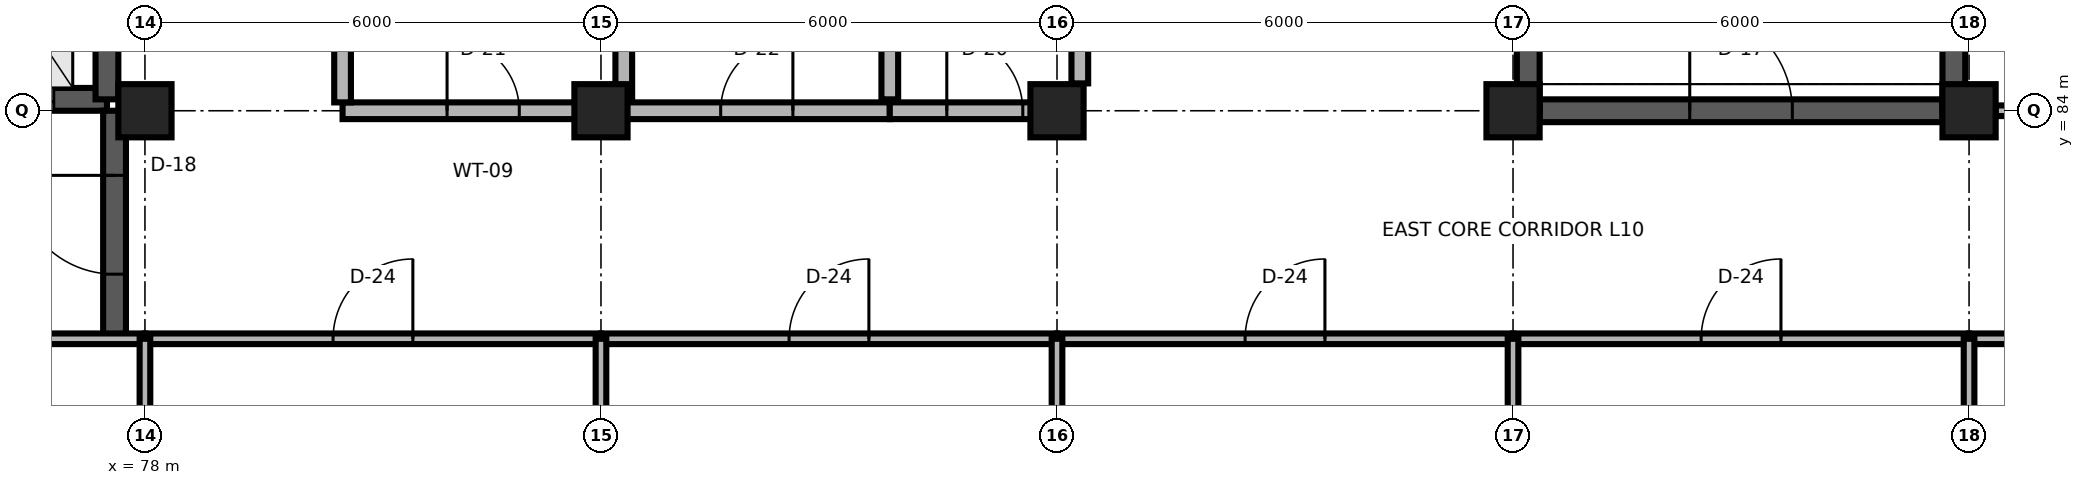
"""IFC4 building model, lengths in metres.
Left out: names, types, materials, properties, quantities, classifications, styles, units other than length and angle.
Written with IfcOpenShell. Run it as: python <this file> out.ifc"""

import sys

from ifc_helpers import new_model, si_unit, direction, frame, frame_2d, origin, origin_2d, place, context, subcontext, project, spatial, rectangle, extrude, element, fill, save


model = new_model("IFC4")
c1 = context("Model", 3, precision=1e-05, world=origin(), true_north=direction((0.0, 1.0)))
c2 = subcontext(c1, "Body", "Model", "MODEL_VIEW")
j1 = project(units=[si_unit("LENGTHUNIT", "METRE"), si_unit("PLANEANGLEUNIT", "RADIAN")], contexts=[c1])
p1 = place(None, origin())
s1 = spatial("IfcSite", under=j1, at=p1, CompositionType="ELEMENT")
p2 = place(p1, origin())
s2 = spatial("IfcBuilding", under=s1, at=p2, CompositionType="ELEMENT")
p3 = place(p2, frame((0.0, 0.0, 40.5)))
s3 = spatial("IfcBuildingStorey", under=s2, at=p3, CompositionType="ELEMENT", Elevation=40.5)
for number, where, z_axis, x_axis in (
    (1, (78.0, 84.0, 0.0), (0.0, 0.0, 1.0), (1.0, 0.0, 0.0)),
    (2, (84.0, 84.0, 0.0), (0.0, 0.0, 1.0), (1.0, 0.0, 0.0)),
    (3, (90.0, 84.0, 0.0), (0.0, 0.0, 1.0), (1.0, 0.0, 0.0)),
    (4, (96.0, 84.0, 0.0), (0.0, 0.0, 1.0), (1.0, 0.0, 0.0)),
    (5, (102.0, 84.0, 0.0), (0.0, 0.0, 1.0), (1.0, 0.0, 0.0)),
):
    element("IfcColumn", number, at=place(p3, frame(where, z_axis=z_axis, x_axis=x_axis)), inside=s3, PredefinedType="COLUMN", context=c2, shape_type="SweptSolid", body=[
        extrude(rectangle(XDim=0.7, YDim=0.7, at=origin_2d()), origin(), (0.0, 0.0, 1.0), 3.9),
    ])
p4 = place(p3, frame((96.35, 84.0, 0.0), z_axis=(0.0, 0.0, 1.0), x_axis=(1.0, 0.0, 0.0)))
e6 = element("IfcWall", 6, at=p4, inside=s3, PredefinedType="SHEAR", context=c2, shape_type="SweptSolid", body=[
    extrude(rectangle(XDim=5.3, YDim=0.3, at=frame_2d((2.65, 0.0))), origin(), (0.0, 0.0, 1.0), 3.66),
])
p5 = place(p4, frame((1.975, 0.0, 0.0)))
e7 = element("IfcOpeningElement", 7, at=p5, cuts=e6, PredefinedType="OPENING", context=c2, shape_type="SweptSolid", body=[
    extrude(rectangle(XDim=1.35, YDim=2.2, at=frame_2d((0.675, 1.1))), frame((0.0, 0.165, 0.0), z_axis=(0.0, -1.0, 0.0), x_axis=(1.0, 0.0, 0.0)), (0.0, 0.0, 1.0), 0.33),
])
for number, where, z_axis, x_axis in (
    (8, (96.2, 84.0, 0.0), (0.0, 0.0, 1.0), (0.0, 1.0, 0.0)),
    (9, (101.8, 84.0, 0.0), (0.0, 0.0, 1.0), (0.0, 1.0, 0.0)),
):
    element("IfcWall", number, at=place(p3, frame(where, z_axis=z_axis, x_axis=x_axis)), inside=s3, PredefinedType="SHEAR", context=c2, shape_type="SweptSolid", body=[
        extrude(rectangle(XDim=11.8, YDim=0.3, at=frame_2d((5.9, 0.0))), origin(), (0.0, 0.0, 1.0), 3.74),
    ])
p6 = place(p3, frame((75.0, 84.15, 0.0), z_axis=(0.0, 0.0, 1.0), x_axis=(1.0, 0.0, 0.0)))
e10 = element("IfcWall", 10, at=p6, inside=s3, PredefinedType="SHEAR", context=c2, shape_type="SweptSolid", body=[
    extrude(rectangle(XDim=2.5, YDim=0.3, at=frame_2d((1.25, 0.0))), origin(), (0.0, 0.0, 1.0), 3.74),
])
p7 = place(p6, frame((0.7, 0.0, 0.0)))
e11 = element("IfcOpeningElement", 11, at=p7, cuts=e10, PredefinedType="OPENING", context=c2, shape_type="SweptSolid", body=[
    extrude(rectangle(XDim=1.1, YDim=2.1, at=frame_2d((0.55, 1.05))), frame((0.0, 0.165, 0.0), z_axis=(0.0, -1.0, 0.0), x_axis=(1.0, 0.0, 0.0)), (0.0, 0.0, 1.0), 0.33),
])
p8 = place(p3, frame((77.5, 84.15, 0.0), z_axis=(0.0, 0.0, 1.0), x_axis=(0.0, 1.0, 0.0)))
e12 = element("IfcWall", 12, at=p8, inside=s3, PredefinedType="SHEAR", context=c2, shape_type="SweptSolid", body=[
    extrude(rectangle(XDim=3.4, YDim=0.3, at=frame_2d((1.7, 0.0))), origin(), (0.0, 0.0, 1.0), 3.74),
])
p9 = place(p3, frame((77.6, 81.0, 0.0), z_axis=(0.0, 0.0, 1.0), x_axis=(0.0, 1.0, 0.0)))
e13 = element("IfcWall", 13, at=p9, inside=s3, PredefinedType="SHEAR", context=c2, shape_type="SweptSolid", body=[
    extrude(rectangle(XDim=3.0, YDim=0.3, at=frame_2d((1.5, 0.0))), origin(), (0.0, 0.0, 1.0), 3.74),
])
p10 = place(p9, frame((0.85, 0.0, 0.0)))
e14 = element("IfcOpeningElement", 14, at=p10, cuts=e13, PredefinedType="OPENING", context=c2, shape_type="SweptSolid", body=[
    extrude(rectangle(XDim=1.3, YDim=2.2, at=frame_2d((0.65, 1.1))), frame((0.0, 0.165, 0.0), z_axis=(0.0, -1.0, 0.0), x_axis=(1.0, 0.0, 0.0)), (0.0, 0.0, 1.0), 0.33),
])
p11 = place(p3, frame((80.6, 84.0, 0.0), z_axis=(0.0, 0.0, 1.0), x_axis=(1.0, 0.0, 0.0)))
e15 = element("IfcWall", 15, at=p11, inside=s3, PredefinedType="PARTITIONING", context=c2, shape_type="SweptSolid", body=[
    extrude(rectangle(XDim=3.7, YDim=0.22, at=frame_2d((1.85, 0.0))), origin(), (0.0, 0.0, 1.0), 3.348),
])
p12 = place(p11, frame((1.375, 0.0, 0.0)))
e16 = element("IfcOpeningElement", 16, at=p12, cuts=e15, PredefinedType="OPENING", context=c2, shape_type="SweptSolid", body=[
    extrude(rectangle(XDim=0.95, YDim=2.15, at=frame_2d((0.475, 1.075))), frame((0.0, 0.125, 0.0), z_axis=(0.0, -1.0, 0.0), x_axis=(1.0, 0.0, 0.0)), (0.0, 0.0, 1.0), 0.25),
])
p13 = place(p3, frame((84.3, 84.0, 0.0), z_axis=(0.0, 0.0, 1.0), x_axis=(1.0, 0.0, 0.0)))
e17 = element("IfcWall", 17, at=p13, inside=s3, PredefinedType="PARTITIONING", context=c2, shape_type="SweptSolid", body=[
    extrude(rectangle(XDim=3.5, YDim=0.22, at=frame_2d((1.75, 0.0))), origin(), (0.0, 0.0, 1.0), 3.348),
])
p14 = place(p13, frame((1.275, 0.0, 0.0)))
e18 = element("IfcOpeningElement", 18, at=p14, cuts=e17, PredefinedType="OPENING", context=c2, shape_type="SweptSolid", body=[
    extrude(rectangle(XDim=0.95, YDim=2.1, at=frame_2d((0.475, 1.05))), frame((0.0, 0.125, 0.0), z_axis=(0.0, -1.0, 0.0), x_axis=(1.0, 0.0, 0.0)), (0.0, 0.0, 1.0), 0.25),
])
p15 = place(p3, frame((87.8, 84.0, 0.0), z_axis=(0.0, 0.0, 1.0), x_axis=(1.0, 0.0, 0.0)))
e19 = element("IfcWall", 19, at=p15, inside=s3, PredefinedType="PARTITIONING", context=c2, shape_type="SweptSolid", body=[
    extrude(rectangle(XDim=2.5, YDim=0.22, at=frame_2d((1.25, 0.0))), origin(), (0.0, 0.0, 1.0), 3.348),
])
p16 = place(p15, frame((0.75, 0.0, 0.0)))
e20 = element("IfcOpeningElement", 20, at=p16, cuts=e19, PredefinedType="OPENING", context=c2, shape_type="SweptSolid", body=[
    extrude(rectangle(XDim=1.0, YDim=2.15, at=frame_2d((0.5, 1.075))), frame((0.0, 0.125, 0.0), z_axis=(0.0, -1.0, 0.0), x_axis=(1.0, 0.0, 0.0)), (0.0, 0.0, 1.0), 0.25),
])
for number, where, z_axis, x_axis in (
    (21, (84.3, 84.15, 0.0), (0.0, 0.0, 1.0), (0.0, 1.0, 0.0)),
    (22, (87.8, 84.15, 0.0), (0.0, 0.0, 1.0), (0.0, 1.0, 0.0)),
):
    element("IfcWall", number, at=place(p3, frame(where, z_axis=z_axis, x_axis=x_axis)), inside=s3, PredefinedType="PARTITIONING", context=c2, shape_type="SweptSolid", body=[
        extrude(rectangle(XDim=5.0, YDim=0.22, at=frame_2d((2.5, 0.0))), origin(), (0.0, 0.0, 1.0), 3.74),
    ])
p17 = place(p3, frame((72.0, 81.0, 0.0), z_axis=(0.0, 0.0, 1.0), x_axis=(1.0, 0.0, 0.0)))
e23 = element("IfcWall", 23, at=p17, inside=s3, PredefinedType="PARTITIONING", context=c2, shape_type="SweptSolid", body=[
    extrude(rectangle(XDim=6.0, YDim=0.14, at=frame_2d((3.0, 0.0))), origin(), (0.0, 0.0, 1.0), 3.74),
])
p18 = place(p17, frame((2.475, 0.0, 0.0)))
e24 = element("IfcOpeningElement", 24, at=p18, cuts=e23, PredefinedType="OPENING", context=c2, shape_type="SweptSolid", body=[
    extrude(rectangle(XDim=1.05, YDim=2.25, at=frame_2d((0.525, 1.125))), frame((0.0, 0.085, 0.0), z_axis=(0.0, -1.0, 0.0), x_axis=(1.0, 0.0, 0.0)), (0.0, 0.0, 1.0), 0.17),
])
p19 = place(p3, frame((78.0, 81.0, 0.0), z_axis=(0.0, 0.0, 1.0), x_axis=(1.0, 0.0, 0.0)))
e25 = element("IfcWall", 25, at=p19, inside=s3, PredefinedType="PARTITIONING", context=c2, shape_type="SweptSolid", body=[
    extrude(rectangle(XDim=6.0, YDim=0.14, at=frame_2d((3.0, 0.0))), origin(), (0.0, 0.0, 1.0), 3.74),
])
p20 = place(p19, frame((2.475, 0.0, 0.0)))
e26 = element("IfcOpeningElement", 26, at=p20, cuts=e25, PredefinedType="OPENING", context=c2, shape_type="SweptSolid", body=[
    extrude(rectangle(XDim=1.05, YDim=2.25, at=frame_2d((0.525, 1.125))), frame((0.0, 0.085, 0.0), z_axis=(0.0, -1.0, 0.0), x_axis=(1.0, 0.0, 0.0)), (0.0, 0.0, 1.0), 0.17),
])
p21 = place(p3, frame((84.0, 81.0, 0.0), z_axis=(0.0, 0.0, 1.0), x_axis=(1.0, 0.0, 0.0)))
e27 = element("IfcWall", 27, at=p21, inside=s3, PredefinedType="PARTITIONING", context=c2, shape_type="SweptSolid", body=[
    extrude(rectangle(XDim=6.0, YDim=0.14, at=frame_2d((3.0, 0.0))), origin(), (0.0, 0.0, 1.0), 3.74),
])
p22 = place(p21, frame((2.475, 0.0, 0.0)))
e28 = element("IfcOpeningElement", 28, at=p22, cuts=e27, PredefinedType="OPENING", context=c2, shape_type="SweptSolid", body=[
    extrude(rectangle(XDim=1.05, YDim=2.25, at=frame_2d((0.525, 1.125))), frame((0.0, 0.085, 0.0), z_axis=(0.0, -1.0, 0.0), x_axis=(1.0, 0.0, 0.0)), (0.0, 0.0, 1.0), 0.17),
])
p23 = place(p3, frame((90.0, 81.0, 0.0), z_axis=(0.0, 0.0, 1.0), x_axis=(1.0, 0.0, 0.0)))
e29 = element("IfcWall", 29, at=p23, inside=s3, PredefinedType="PARTITIONING", context=c2, shape_type="SweptSolid", body=[
    extrude(rectangle(XDim=6.0, YDim=0.14, at=frame_2d((3.0, 0.0))), origin(), (0.0, 0.0, 1.0), 3.74),
])
p24 = place(p23, frame((2.475, 0.0, 0.0)))
e30 = element("IfcOpeningElement", 30, at=p24, cuts=e29, PredefinedType="OPENING", context=c2, shape_type="SweptSolid", body=[
    extrude(rectangle(XDim=1.05, YDim=2.25, at=frame_2d((0.525, 1.125))), frame((0.0, 0.085, 0.0), z_axis=(0.0, -1.0, 0.0), x_axis=(1.0, 0.0, 0.0)), (0.0, 0.0, 1.0), 0.17),
])
p25 = place(p3, frame((96.0, 81.0, 0.0), z_axis=(0.0, 0.0, 1.0), x_axis=(1.0, 0.0, 0.0)))
e31 = element("IfcWall", 31, at=p25, inside=s3, PredefinedType="PARTITIONING", context=c2, shape_type="SweptSolid", body=[
    extrude(rectangle(XDim=6.0, YDim=0.14, at=frame_2d((3.0, 0.0))), origin(), (0.0, 0.0, 1.0), 3.74),
])
p26 = place(p25, frame((2.475, 0.0, 0.0)))
e32 = element("IfcOpeningElement", 32, at=p26, cuts=e31, PredefinedType="OPENING", context=c2, shape_type="SweptSolid", body=[
    extrude(rectangle(XDim=1.05, YDim=2.25, at=frame_2d((0.525, 1.125))), frame((0.0, 0.085, 0.0), z_axis=(0.0, -1.0, 0.0), x_axis=(1.0, 0.0, 0.0)), (0.0, 0.0, 1.0), 0.17),
])
p27 = place(p3, frame((102.0, 81.0, 0.0), z_axis=(0.0, 0.0, 1.0), x_axis=(1.0, 0.0, 0.0)))
e33 = element("IfcWall", 33, at=p27, inside=s3, PredefinedType="PARTITIONING", context=c2, shape_type="SweptSolid", body=[
    extrude(rectangle(XDim=4.3, YDim=0.14, at=frame_2d((2.15, 0.0))), origin(), (0.0, 0.0, 1.0), 3.74),
])
p28 = place(p27, frame((1.625, 0.0, 0.0)))
e34 = element("IfcOpeningElement", 34, at=p28, cuts=e33, PredefinedType="OPENING", context=c2, shape_type="SweptSolid", body=[
    extrude(rectangle(XDim=1.05, YDim=2.25, at=frame_2d((0.525, 1.125))), frame((0.0, 0.085, 0.0), z_axis=(0.0, -1.0, 0.0), x_axis=(1.0, 0.0, 0.0)), (0.0, 0.0, 1.0), 0.17),
])
p29 = place(p3, frame((102.35, 84.0, 0.0), z_axis=(0.0, 0.0, 1.0), x_axis=(1.0, 0.0, 0.0)))
e35 = element("IfcWall", 35, at=p29, inside=s3, PredefinedType="PARTITIONING", context=c2, shape_type="SweptSolid", body=[
    extrude(rectangle(XDim=5.3, YDim=0.14, at=frame_2d((2.65, 0.0))), origin(), (0.0, 0.0, 1.0), 3.348),
])
p30 = place(p29, frame((2.125, 0.0, 0.0)))
e36 = element("IfcOpeningElement", 36, at=p30, cuts=e35, PredefinedType="OPENING", context=c2, shape_type="SweptSolid", body=[
    extrude(rectangle(XDim=1.05, YDim=2.25, at=frame_2d((0.525, 1.125))), frame((0.0, 0.085, 0.0), z_axis=(0.0, -1.0, 0.0), x_axis=(1.0, 0.0, 0.0)), (0.0, 0.0, 1.0), 0.17),
])
for number, where, z_axis, x_axis in (
    (37, (78.0, 72.65, 0.0), (0.0, 0.0, 1.0), (0.0, 1.0, 0.0)),
    (38, (84.0, 72.65, 0.0), (0.0, 0.0, 1.0), (0.0, 1.0, 0.0)),
    (39, (90.0, 72.65, 0.0), (0.0, 0.0, 1.0), (0.0, 1.0, 0.0)),
    (40, (96.0, 72.65, 0.0), (0.0, 0.0, 1.0), (0.0, 1.0, 0.0)),
    (41, (102.0, 72.65, 0.0), (0.0, 0.0, 1.0), (0.0, 1.0, 0.0)),
):
    element("IfcWall", number, at=place(p3, frame(where, z_axis=z_axis, x_axis=x_axis)), inside=s3, PredefinedType="PARTITIONING", context=c2, shape_type="SweptSolid", body=[
        extrude(rectangle(XDim=8.35, YDim=0.14, at=frame_2d((4.175, 0.0))), origin(), (0.0, 0.0, 1.0), 3.348),
    ])
p31 = place(p3, frame((80.6, 84.11, 0.0), z_axis=(0.0, 0.0, 1.0), x_axis=(0.0, 1.0, 0.0)))
e42 = element("IfcWall", 42, at=p31, inside=s3, PredefinedType="PARTITIONING", context=c2, shape_type="SweptSolid", body=[
    extrude(rectangle(XDim=4.98, YDim=0.22, at=frame_2d((2.49, 0.0))), origin(), (0.0, 0.0, 1.0), 3.74),
])
p32 = place(p3, frame((90.3, 84.36, 0.0), z_axis=(0.0, 0.0, 1.0), x_axis=(0.0, 1.0, 0.0)))
e43 = element("IfcWall", 43, at=p32, inside=s3, PredefinedType="PARTITIONING", context=c2, shape_type="SweptSolid", body=[
    extrude(rectangle(XDim=4.73, YDim=0.22, at=frame_2d((2.365, 0.0))), origin(), (0.0, 0.0, 1.0), 3.74),
])
p33 = place(p5, origin())
e44 = element("IfcDoor", 44, at=p33, inside=s3, OperationType="SINGLE_SWING_LEFT", PredefinedType="DOOR", context=c2, shape_type="SweptSolid", body=[
    extrude(rectangle(XDim=1.35, YDim=2.2, at=frame_2d((0.675, 1.1))), frame((0.0, 0.025, 0.0), z_axis=(0.0, -1.0, 0.0), x_axis=(1.0, 0.0, 0.0)), (0.0, 0.0, 1.0), 0.05),
])
fill(e7, e44)
p34 = place(p7, origin())
e45 = element("IfcDoor", 45, at=p34, inside=s3, OperationType="DOUBLE_DOOR_SLIDING", PredefinedType="DOOR", context=c2, shape_type="SweptSolid", body=[
    extrude(rectangle(XDim=1.1, YDim=2.1, at=frame_2d((0.55, 1.05))), frame((0.0, 0.025, 0.0), z_axis=(0.0, -1.0, 0.0), x_axis=(1.0, 0.0, 0.0)), (0.0, 0.0, 1.0), 0.05),
])
fill(e11, e45)
p35 = place(p10, origin())
e46 = element("IfcDoor", 46, at=p35, inside=s3, OperationType="SINGLE_SWING_RIGHT", PredefinedType="DOOR", context=c2, shape_type="SweptSolid", body=[
    extrude(rectangle(XDim=1.3, YDim=2.2, at=frame_2d((0.65, 1.1))), frame((0.0, 0.025, 0.0), z_axis=(0.0, -1.0, 0.0), x_axis=(1.0, 0.0, 0.0)), (0.0, 0.0, 1.0), 0.05),
])
fill(e14, e46)
p36 = place(p12, origin())
e47 = element("IfcDoor", 47, at=p36, inside=s3, OperationType="SINGLE_SWING_LEFT", PredefinedType="DOOR", context=c2, shape_type="SweptSolid", body=[
    extrude(rectangle(XDim=0.95, YDim=2.15, at=frame_2d((0.475, 1.075))), frame((0.0, 0.025, 0.0), z_axis=(0.0, -1.0, 0.0), x_axis=(1.0, 0.0, 0.0)), (0.0, 0.0, 1.0), 0.05),
])
fill(e16, e47)
p37 = place(p14, origin())
e48 = element("IfcDoor", 48, at=p37, inside=s3, OperationType="SINGLE_SWING_RIGHT", PredefinedType="DOOR", context=c2, shape_type="SweptSolid", body=[
    extrude(rectangle(XDim=0.95, YDim=2.1, at=frame_2d((0.475, 1.05))), frame((0.0, 0.025, 0.0), z_axis=(0.0, -1.0, 0.0), x_axis=(1.0, 0.0, 0.0)), (0.0, 0.0, 1.0), 0.05),
])
fill(e18, e48)
p38 = place(p16, origin())
e49 = element("IfcDoor", 49, at=p38, inside=s3, OperationType="SINGLE_SWING_LEFT", PredefinedType="DOOR", context=c2, shape_type="SweptSolid", body=[
    extrude(rectangle(XDim=1.0, YDim=2.15, at=frame_2d((0.5, 1.075))), frame((0.0, 0.025, 0.0), z_axis=(0.0, -1.0, 0.0), x_axis=(1.0, 0.0, 0.0)), (0.0, 0.0, 1.0), 0.05),
])
fill(e20, e49)
p39 = place(p20, origin())
e50 = element("IfcDoor", 50, at=p39, inside=s3, OperationType="SINGLE_SWING_RIGHT", PredefinedType="DOOR", context=c2, shape_type="SweptSolid", body=[
    extrude(rectangle(XDim=1.05, YDim=2.25, at=frame_2d((0.525, 1.125))), frame((0.0, 0.025, 0.0), z_axis=(0.0, -1.0, 0.0), x_axis=(1.0, 0.0, 0.0)), (0.0, 0.0, 1.0), 0.05),
])
fill(e26, e50)
p40 = place(p22, origin())
e51 = element("IfcDoor", 51, at=p40, inside=s3, OperationType="SINGLE_SWING_RIGHT", PredefinedType="DOOR", context=c2, shape_type="SweptSolid", body=[
    extrude(rectangle(XDim=1.05, YDim=2.25, at=frame_2d((0.525, 1.125))), frame((0.0, 0.025, 0.0), z_axis=(0.0, -1.0, 0.0), x_axis=(1.0, 0.0, 0.0)), (0.0, 0.0, 1.0), 0.05),
])
fill(e28, e51)
p41 = place(p24, origin())
e52 = element("IfcDoor", 52, at=p41, inside=s3, OperationType="SINGLE_SWING_RIGHT", PredefinedType="DOOR", context=c2, shape_type="SweptSolid", body=[
    extrude(rectangle(XDim=1.05, YDim=2.25, at=frame_2d((0.525, 1.125))), frame((0.0, 0.025, 0.0), z_axis=(0.0, -1.0, 0.0), x_axis=(1.0, 0.0, 0.0)), (0.0, 0.0, 1.0), 0.05),
])
fill(e30, e52)
p42 = place(p26, origin())
e53 = element("IfcDoor", 53, at=p42, inside=s3, OperationType="SINGLE_SWING_RIGHT", PredefinedType="DOOR", context=c2, shape_type="SweptSolid", body=[
    extrude(rectangle(XDim=1.05, YDim=2.25, at=frame_2d((0.525, 1.125))), frame((0.0, 0.025, 0.0), z_axis=(0.0, -1.0, 0.0), x_axis=(1.0, 0.0, 0.0)), (0.0, 0.0, 1.0), 0.05),
])
fill(e32, e53)
save(model, sys.argv[1])
